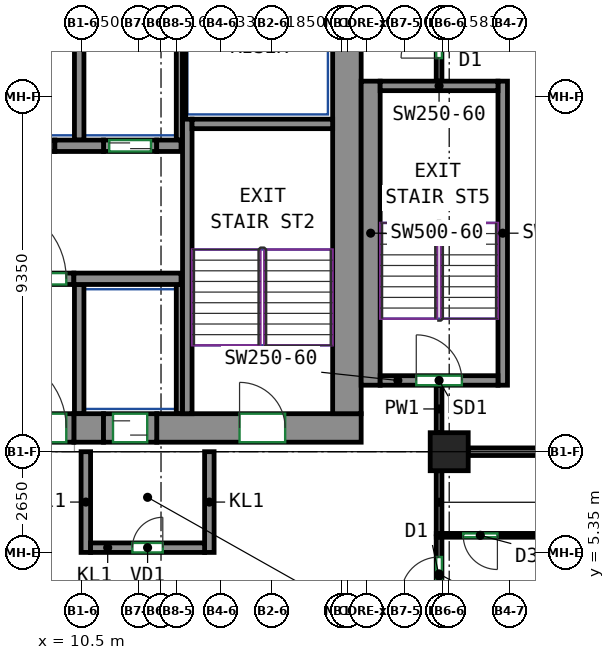
"""IFC4 building model, lengths in metres.
Left out: names, types, materials, properties, quantities, classifications, styles, units other than length and angle.
Written with IfcOpenShell. Run it as: python <this file> out.ifc"""

import sys

from ifc_helpers import new_model, si_unit, direction, frame, frame_2d, origin, origin_2d, place, context, subcontext, project, spatial, rectangle, extrude, source, transform, mapped, element, fill, save


model = new_model("IFC4")
c1 = context("Model", 3, precision=1e-05, world=origin(), true_north=direction((0.0, 1.0)))
c2 = subcontext(c1, "Body", "Model", "MODEL_VIEW")
j1 = project(units=[si_unit("LENGTHUNIT", "METRE"), si_unit("PLANEANGLEUNIT", "RADIAN")], contexts=[c1])
p1 = place(None, origin())
s1 = spatial("IfcSite", under=j1, at=p1, CompositionType="ELEMENT")
p2 = place(p1, origin())
s2 = spatial("IfcBuilding", under=s1, at=p2, CompositionType="ELEMENT")
p3 = place(p2, frame((0.0, 0.0, 206.7)))
s3 = spatial("IfcBuildingStorey", under=s2, at=p3, CompositionType="ELEMENT", Elevation=206.7)
m1 = source(origin(), c2, "Body", "SweptSolid", [
    extrude(rectangle(XDim=1.0, YDim=1.0, at=origin_2d()), origin(), (0.0, 0.0, 1.0), 3.12),
])
p4 = place(p3, frame((20.167, 8.0, 0.0), z_axis=(0.0, 0.0, 1.0), x_axis=(1.0, 0.0, 0.0)))
e1 = element("IfcColumn", 1, at=p4, inside=s3, PredefinedType="COLUMN", context=c2, shape_type="MappedRepresentation", body=[
    mapped(m1, transform((0.0, 0.0, 0.0))),
])
m2 = source(origin(), c2, "Body", "SweptSolid", [
    extrude(rectangle(XDim=0.78, YDim=0.75, at=frame_2d((0.39, 0.0))), origin(), (0.0, 0.0, 1.0), 3.12),
])
p5 = place(p3, frame((10.29, 8.625, 0.0), z_axis=(0.0, 0.0, 1.0), x_axis=(1.0, 0.0, 0.0)))
e2 = element("IfcWall", 2, at=p5, inside=s3, PredefinedType="SHEAR", context=c2, shape_type="MappedRepresentation", body=[
    mapped(m2, transform((0.0, 0.0, 0.0))),
])
m3 = source(origin(), c2, "Body", "SweptSolid", [
    extrude(rectangle(XDim=5.38, YDim=0.75, at=frame_2d((2.69, 0.0))), origin(), (0.0, 0.0, 1.0), 3.12),
])
p6 = place(p3, frame((12.47, 8.625, 0.0), z_axis=(0.0, 0.0, 1.0), x_axis=(1.0, 0.0, 0.0)))
e3 = element("IfcWall", 3, at=p6, inside=s3, PredefinedType="SHEAR", context=c2, shape_type="MappedRepresentation", body=[
    mapped(m3, transform((0.0, 0.0, 0.0))),
])
p7 = place(p6, frame((2.18, 0.0, 0.0)))
e4 = element("IfcOpeningElement", 4, at=p7, cuts=e3, PredefinedType="OPENING", context=c2, shape_type="SweptSolid", body=[
    extrude(rectangle(XDim=1.2, YDim=2.1, at=frame_2d((0.6, 1.05))), frame((0.0, 0.385, 0.0), z_axis=(0.0, -1.0, 0.0), x_axis=(1.0, 0.0, 0.0)), (0.0, 0.0, 1.0), 0.77),
])
m4 = source(origin(), c2, "Body", "SweptSolid", [
    extrude(rectangle(XDim=12.0, YDim=0.75, at=frame_2d((6.0, 0.0))), origin(), (0.0, 0.0, 1.0), 3.12),
])
p8 = place(p3, frame((17.475, 9.0, 0.0), z_axis=(0.0, 0.0, 1.0), x_axis=(0.0, 1.0, 0.0)))
e5 = element("IfcWall", 5, at=p8, inside=s3, PredefinedType="SHEAR", context=c2, shape_type="MappedRepresentation", body=[
    mapped(m4, transform((0.0, 0.0, 0.0))),
])
m5 = source(origin(), c2, "Body", "SweptSolid", [
    extrude(rectangle(XDim=7.75, YDim=0.25, at=frame_2d((3.875, 0.0))), origin(), (0.0, 0.0, 1.0), 3.12),
])
p9 = place(p3, frame((13.275, 9.0, 0.0), z_axis=(0.0, 0.0, 1.0), x_axis=(0.0, 1.0, 0.0)))
e6 = element("IfcWall", 6, at=p9, inside=s3, PredefinedType="SHEAR", context=c2, shape_type="MappedRepresentation", body=[
    mapped(m5, transform((0.0, 0.0, 0.0))),
])
m6 = source(origin(), c2, "Body", "SweptSolid", [
    extrude(rectangle(XDim=3.7, YDim=0.25, at=frame_2d((1.85, 0.0))), origin(), (0.0, 0.0, 1.0), 3.12),
])
p10 = place(p3, frame((13.4, 16.625, 0.0), z_axis=(0.0, 0.0, 1.0), x_axis=(1.0, 0.0, 0.0)))
e7 = element("IfcWall", 7, at=p10, inside=s3, PredefinedType="SHEAR", context=c2, shape_type="MappedRepresentation", body=[
    mapped(m6, transform((0.0, 0.0, 0.0))),
])
m7 = source(origin(), c2, "Body", "SweptSolid", [
    extrude(rectangle(XDim=8.0, YDim=0.5, at=frame_2d((4.0, 0.0))), origin(), (0.0, 0.0, 1.0), 3.12),
])
p11 = place(p3, frame((18.1, 9.75, 0.0), z_axis=(0.0, 0.0, 1.0), x_axis=(0.0, 1.0, 0.0)))
e8 = element("IfcWall", 8, at=p11, inside=s3, PredefinedType="SHEAR", context=c2, shape_type="MappedRepresentation", body=[
    mapped(m7, transform((0.0, 0.0, 0.0))),
])
m8 = source(origin(), c2, "Body", "SweptSolid", [
    extrude(rectangle(XDim=8.0, YDim=0.25, at=frame_2d((4.0, 0.0))), origin(), (0.0, 0.0, 1.0), 3.12),
])
p12 = place(p3, frame((21.575, 9.75, 0.0), z_axis=(0.0, 0.0, 1.0), x_axis=(0.0, 1.0, 0.0)))
e9 = element("IfcWall", 9, at=p12, inside=s3, PredefinedType="SHEAR", context=c2, shape_type="MappedRepresentation", body=[
    mapped(m8, transform((0.0, 0.0, 0.0))),
])
m9 = source(origin(), c2, "Body", "SweptSolid", [
    extrude(rectangle(XDim=3.1, YDim=0.25, at=frame_2d((1.55, 0.0))), origin(), (0.0, 0.0, 1.0), 3.12),
])
p13 = place(p3, frame((18.35, 9.875, 0.0), z_axis=(0.0, 0.0, 1.0), x_axis=(1.0, 0.0, 0.0)))
e10 = element("IfcWall", 10, at=p13, inside=s3, PredefinedType="SHEAR", context=c2, shape_type="MappedRepresentation", body=[
    mapped(m9, transform((0.0, 0.0, 0.0))),
])
p14 = place(p13, frame((0.95, 0.0, 0.0)))
e11 = element("IfcOpeningElement", 11, at=p14, cuts=e10, PredefinedType="OPENING", context=c2, shape_type="SweptSolid", body=[
    extrude(rectangle(XDim=1.2, YDim=2.1, at=frame_2d((0.6, 1.05))), frame((0.0, 0.135, 0.0), z_axis=(0.0, -1.0, 0.0), x_axis=(1.0, 0.0, 0.0)), (0.0, 0.0, 1.0), 0.27),
])
p15 = place(p3, frame((18.35, 17.625, 0.0), z_axis=(0.0, 0.0, 1.0), x_axis=(1.0, 0.0, 0.0)))
e12 = element("IfcWall", 12, at=p15, inside=s3, PredefinedType="SHEAR", context=c2, shape_type="MappedRepresentation", body=[
    mapped(m9, transform((0.0, 0.0, 0.0))),
])
m10 = source(origin(), c2, "Body", "SweptSolid", [
    extrude(rectangle(XDim=2.82, YDim=0.3, at=frame_2d((1.41, 0.0))), origin(), (0.0, 0.0, 1.0), 3.12),
])
p16 = place(p3, frame((10.29, 12.55, 0.0), z_axis=(0.0, 0.0, 1.0), x_axis=(1.0, 0.0, 0.0)))
e13 = element("IfcWall", 13, at=p16, inside=s3, PredefinedType="SHEAR", context=c2, shape_type="MappedRepresentation", body=[
    mapped(m10, transform((0.0, 0.0, 0.0))),
])
m11 = source(origin(), c2, "Body", "SweptSolid", [
    extrude(rectangle(XDim=1.28, YDim=0.3, at=frame_2d((0.64, 0.0))), origin(), (0.0, 0.0, 1.0), 3.12),
])
p17 = place(p3, frame((9.79, 16.05, 0.0), z_axis=(0.0, 0.0, 1.0), x_axis=(1.0, 0.0, 0.0)))
e14 = element("IfcWall", 14, at=p17, inside=s3, PredefinedType="SHEAR", context=c2, shape_type="MappedRepresentation", body=[
    mapped(m11, transform((0.0, 0.0, 0.0))),
])
m12 = source(origin(), c2, "Body", "SweptSolid", [
    extrude(rectangle(XDim=0.64, YDim=0.3, at=frame_2d((0.32, 0.0))), origin(), (0.0, 0.0, 1.0), 3.12),
])
p18 = place(p3, frame((12.47, 16.05, 0.0), z_axis=(0.0, 0.0, 1.0), x_axis=(1.0, 0.0, 0.0)))
e15 = element("IfcWall", 15, at=p18, inside=s3, PredefinedType="SHEAR", context=c2, shape_type="MappedRepresentation", body=[
    mapped(m12, transform((0.0, 0.0, 0.0))),
])
m13 = source(origin(), c2, "Body", "SweptSolid", [
    extrude(rectangle(XDim=1.4, YDim=0.3, at=frame_2d((0.7, 0.0))), origin(), (0.0, 0.0, 1.0), 3.12),
])
p19 = place(p3, frame((11.07, 16.05, 0.0), z_axis=(0.0, 0.0, 1.0), x_axis=(1.0, 0.0, 0.0)))
e16 = element("IfcWall", 16, at=p19, inside=s3, PredefinedType="PARTITIONING", context=c2, shape_type="MappedRepresentation", body=[
    mapped(m13, transform((0.0, 0.0, 0.0))),
])
p20 = place(p19, frame((0.15, 0.0, 0.0)))
e17 = element("IfcOpeningElement", 17, at=p20, cuts=e16, PredefinedType="OPENING", context=c2, shape_type="SweptSolid", body=[
    extrude(rectangle(XDim=1.1, YDim=2.1, at=frame_2d((0.55, 1.05))), frame((0.0, 0.16, 0.0), z_axis=(0.0, -1.0, 0.0), x_axis=(1.0, 0.0, 0.0)), (0.0, 0.0, 1.0), 0.32),
])
m14 = source(origin(), c2, "Body", "SweptSolid", [
    extrude(rectangle(XDim=2.4, YDim=0.3, at=frame_2d((1.2, 0.0))), origin(), (0.0, 0.0, 1.0), 3.12),
])
p21 = place(p3, frame((7.89, 12.55, 0.0), z_axis=(0.0, 0.0, 1.0), x_axis=(1.0, 0.0, 0.0)))
e18 = element("IfcWall", 18, at=p21, inside=s3, PredefinedType="PARTITIONING", context=c2, shape_type="MappedRepresentation", body=[
    mapped(m14, transform((0.0, 0.0, 0.0))),
])
p22 = place(p21, frame((0.2, 0.0, 0.0)))
e19 = element("IfcOpeningElement", 19, at=p22, cuts=e18, PredefinedType="OPENING", context=c2, shape_type="SweptSolid", body=[
    extrude(rectangle(XDim=2.0, YDim=2.1, at=frame_2d((1.0, 1.05))), frame((0.0, 0.16, 0.0), z_axis=(0.0, -1.0, 0.0), x_axis=(1.0, 0.0, 0.0)), (0.0, 0.0, 1.0), 0.32),
])
m15 = source(origin(), c2, "Body", "SweptSolid", [
    extrude(rectangle(XDim=1.4, YDim=0.3, at=frame_2d((0.7, 0.0))), origin(), (0.0, 0.0, 1.0), 3.12),
])
p23 = place(p3, frame((8.39, 16.05, 0.0), z_axis=(0.0, 0.0, 1.0), x_axis=(1.0, 0.0, 0.0)))
e20 = element("IfcWall", 20, at=p23, inside=s3, PredefinedType="PARTITIONING", context=c2, shape_type="MappedRepresentation", body=[
    mapped(m15, transform((0.0, 0.0, 0.0))),
])
m16 = source(origin(), c2, "Body", "SweptSolid", [
    extrude(rectangle(XDim=2.65, YDim=0.25, at=frame_2d((1.325, 0.0))), origin(), (0.0, 0.0, 1.0), 3.12),
])
for number, where, z_axis, x_axis in (
    (21, (10.605, 5.35, 0.0), (0.0, 0.0, 1.0), (0.0, 1.0, 0.0)),
    (22, (13.855, 5.35, 0.0), (0.0, 0.0, 1.0), (0.0, 1.0, 0.0)),
):
    element("IfcWall", number, at=place(p3, frame(where, z_axis=z_axis, x_axis=x_axis)), inside=s3, PredefinedType="PARTITIONING", context=c2, shape_type="MappedRepresentation", body=[
        mapped(m16, transform((0.0, 0.0, 0.0))),
    ])
m17 = source(origin(), c2, "Body", "SweptSolid", [
    extrude(rectangle(XDim=3.0, YDim=0.25, at=frame_2d((1.5, 0.0))), origin(), (0.0, 0.0, 1.0), 3.12),
])
p24 = place(p3, frame((10.73, 5.475, 0.0), z_axis=(0.0, 0.0, 1.0), x_axis=(1.0, 0.0, 0.0)))
e23 = element("IfcWall", 23, at=p24, inside=s3, PredefinedType="PARTITIONING", context=c2, shape_type="MappedRepresentation", body=[
    mapped(m17, transform((0.0, 0.0, 0.0))),
])
p25 = place(p24, frame((1.1, 0.0, 0.0)))
e24 = element("IfcOpeningElement", 24, at=p25, cuts=e23, PredefinedType="OPENING", context=c2, shape_type="SweptSolid", body=[
    extrude(rectangle(XDim=0.8, YDim=2.0, at=frame_2d((0.4, 1.0))), frame((0.0, 0.135, 0.0), z_axis=(0.0, -1.0, 0.0), x_axis=(1.0, 0.0, 0.0)), (0.0, 0.0, 1.0), 0.27),
])
m18 = source(origin(), c2, "Body", "SweptSolid", [
    extrude(rectangle(XDim=3.275, YDim=0.165, at=frame_2d((1.638, 0.0))), origin(), (0.0, 0.0, 1.0), 3.12),
])
p26 = place(p3, frame((13.067, 16.2, 0.0), z_axis=(0.0, 0.0, 1.0), x_axis=(0.0, 1.0, 0.0)))
e25 = element("IfcWall", 25, at=p26, inside=s3, PredefinedType="PARTITIONING", context=c2, shape_type="MappedRepresentation", body=[
    mapped(m18, transform((0.0, 0.0, 0.0))),
])
m19 = source(origin(), c2, "Body", "SweptSolid", [
    extrude(rectangle(XDim=3.275, YDim=0.25, at=frame_2d((1.638, 0.0))), origin(), (0.0, 0.0, 1.0), 3.12),
])
p27 = place(p3, frame((10.43, 16.2, 0.0), z_axis=(0.0, 0.0, 1.0), x_axis=(0.0, 1.0, 0.0)))
e26 = element("IfcWall", 26, at=p27, inside=s3, PredefinedType="PARTITIONING", context=c2, shape_type="MappedRepresentation", body=[
    mapped(m19, transform((0.0, 0.0, 0.0))),
])
m20 = source(origin(), c2, "Body", "SweptSolid", [
    extrude(rectangle(XDim=2.725, YDim=0.085, at=frame_2d((1.363, 0.0))), origin(), (0.0, 0.0, 1.0), 3.12),
])
p28 = place(p3, frame((13.192, 16.75, 0.0), z_axis=(0.0, 0.0, 1.0), x_axis=(0.0, 1.0, 0.0)))
e27 = element("IfcWall", 27, at=p28, inside=s3, PredefinedType="PARTITIONING", context=c2, shape_type="MappedRepresentation", body=[
    mapped(m20, transform((0.0, 0.0, 0.0))),
])
m21 = source(origin(), c2, "Body", "SweptSolid", [
    extrude(rectangle(XDim=3.4, YDim=0.25, at=frame_2d((1.7, 0.0))), origin(), (0.0, 0.0, 1.0), 3.12),
])
p29 = place(p3, frame((10.43, 9.0, 0.0), z_axis=(0.0, 0.0, 1.0), x_axis=(0.0, 1.0, 0.0)))
e28 = element("IfcWall", 28, at=p29, inside=s3, PredefinedType="PARTITIONING", context=c2, shape_type="MappedRepresentation", body=[
    mapped(m21, transform((0.0, 0.0, 0.0))),
])
m22 = source(origin(), c2, "Body", "SweptSolid", [
    extrude(rectangle(XDim=3.4, YDim=0.165, at=frame_2d((1.7, 0.0))), origin(), (0.0, 0.0, 1.0), 3.12),
])
p30 = place(p3, frame((13.067, 9.0, 0.0), z_axis=(0.0, 0.0, 1.0), x_axis=(0.0, 1.0, 0.0)))
e29 = element("IfcWall", 29, at=p30, inside=s3, PredefinedType="PARTITIONING", context=c2, shape_type="MappedRepresentation", body=[
    mapped(m22, transform((0.0, 0.0, 0.0))),
])
m23 = source(origin(), c2, "Body", "SweptSolid", [
    extrude(rectangle(XDim=2.4, YDim=0.75, at=frame_2d((1.2, 0.0))), origin(), (0.0, 0.0, 1.0), 2.7),
])
p31 = place(p3, frame((7.89, 8.625, 0.0), z_axis=(0.0, 0.0, 1.0), x_axis=(1.0, 0.0, 0.0)))
e30 = element("IfcWall", 30, at=p31, inside=s3, PredefinedType="PARTITIONING", context=c2, shape_type="MappedRepresentation", body=[
    mapped(m23, transform((0.0, 0.0, 0.0))),
])
p32 = place(p31, frame((0.2, 0.0, 0.0)))
e31 = element("IfcOpeningElement", 31, at=p32, cuts=e30, PredefinedType="OPENING", context=c2, shape_type="SweptSolid", body=[
    extrude(rectangle(XDim=2.0, YDim=2.1, at=frame_2d((1.0, 1.05))), frame((0.0, 0.385, 0.0), z_axis=(0.0, -1.0, 0.0), x_axis=(1.0, 0.0, 0.0)), (0.0, 0.0, 1.0), 0.77),
])
m24 = source(origin(), c2, "Body", "SweptSolid", [
    extrude(rectangle(XDim=1.4, YDim=0.75, at=frame_2d((0.7, 0.0))), origin(), (0.0, 0.0, 1.0), 2.7),
])
p33 = place(p3, frame((11.07, 8.625, 0.0), z_axis=(0.0, 0.0, 1.0), x_axis=(1.0, 0.0, 0.0)))
e32 = element("IfcWall", 32, at=p33, inside=s3, PredefinedType="PARTITIONING", context=c2, shape_type="MappedRepresentation", body=[
    mapped(m24, transform((0.0, 0.0, 0.0))),
])
p34 = place(p33, frame((0.25, 0.0, 0.0)))
e33 = element("IfcOpeningElement", 33, at=p34, cuts=e32, PredefinedType="OPENING", context=c2, shape_type="SweptSolid", body=[
    extrude(rectangle(XDim=0.9, YDim=2.1, at=frame_2d((0.45, 1.05))), frame((0.0, 0.385, 0.0), z_axis=(0.0, -1.0, 0.0), x_axis=(1.0, 0.0, 0.0)), (0.0, 0.0, 1.0), 0.77),
])
p35 = place(p3, frame((19.9, 3.809, 0.0), z_axis=(0.0, 0.0, 1.0), x_axis=(0.0, 1.0, 0.0)))
e34 = element("IfcWall", 34, at=p35, inside=s3, PredefinedType="PARTITIONING", context=c2, shape_type="SweptSolid", body=[
    extrude(rectangle(XDim=1.951, YDim=0.15, at=frame_2d((0.976, 0.0))), origin(), (0.0, 0.0, 1.0), 2.52),
])
p36 = place(p35, frame((0.42, 0.0, 0.0)))
e35 = element("IfcOpeningElement", 35, at=p36, cuts=e34, PredefinedType="OPENING", context=c2, shape_type="SweptSolid", body=[
    extrude(rectangle(XDim=1.0, YDim=2.1, at=frame_2d((0.5, 1.05))), frame((0.0, 0.085, 0.0), z_axis=(0.0, -1.0, 0.0), x_axis=(1.0, 0.0, 0.0)), (0.0, 0.0, 1.0), 0.17),
])
p37 = place(p3, frame((19.9, 5.84, 0.0), z_axis=(0.0, 0.0, 1.0), x_axis=(0.0, 1.0, 0.0)))
e36 = element("IfcWall", 36, at=p37, inside=s3, PredefinedType="PARTITIONING", context=c2, shape_type="SweptSolid", body=[
    extrude(rectangle(XDim=1.66, YDim=0.15, at=frame_2d((0.83, 0.0))), origin(), (0.0, 0.0, 1.0), 2.52),
])
p38 = place(p3, frame((19.9, 17.75, 0.0), z_axis=(0.0, 0.0, 1.0), x_axis=(0.0, 1.0, 0.0)))
e37 = element("IfcWall", 37, at=p38, inside=s3, PredefinedType="PARTITIONING", context=c2, shape_type="SweptSolid", body=[
    extrude(rectangle(XDim=2.01, YDim=0.15, at=frame_2d((1.005, 0.0))), origin(), (0.0, 0.0, 1.0), 3.12),
])
p39 = place(p38, frame((0.607, 0.0, 0.0)))
e38 = element("IfcOpeningElement", 38, at=p39, cuts=e37, PredefinedType="OPENING", context=c2, shape_type="SweptSolid", body=[
    extrude(rectangle(XDim=1.0, YDim=2.1, at=frame_2d((0.5, 1.05))), frame((0.0, 0.085, 0.0), z_axis=(0.0, -1.0, 0.0), x_axis=(1.0, 0.0, 0.0)), (0.0, 0.0, 1.0), 0.17),
])
p40 = place(p3, frame((19.9, 8.5, 0.0), z_axis=(0.0, 0.0, 1.0), x_axis=(0.0, 1.0, 0.0)))
e39 = element("IfcWall", 39, at=p40, inside=s3, PredefinedType="PARTITIONING", context=c2, shape_type="SweptSolid", body=[
    extrude(rectangle(XDim=1.25, YDim=0.15, at=frame_2d((0.625, 0.0))), origin(), (0.0, 0.0, 1.0), 3.12),
])
p41 = place(p3, frame((22.652, 5.8, 0.0), z_axis=(0.0, 0.0, 1.0), x_axis=(-1.0, 0.0, 0.0)))
e40 = element("IfcWall", 40, at=p41, inside=s3, PredefinedType="PARTITIONING", context=c2, shape_type="SweptSolid", body=[
    extrude(rectangle(XDim=2.825, YDim=0.1, at=frame_2d((1.413, 0.0))), origin(), (0.0, 0.0, 1.0), 3.12),
])
p42 = place(p41, frame((1.217, 0.0, 0.0)))
e41 = element("IfcOpeningElement", 41, at=p42, cuts=e40, PredefinedType="OPENING", context=c2, shape_type="SweptSolid", body=[
    extrude(rectangle(XDim=0.9, YDim=2.1, at=frame_2d((0.45, 1.05))), frame((0.0, 0.06, 0.0), z_axis=(0.0, -1.0, 0.0), x_axis=(1.0, 0.0, 0.0)), (0.0, 0.0, 1.0), 0.12),
])
p43 = place(p3, frame((20.667, 8.0, 0.0), z_axis=(0.0, 0.0, 1.0), x_axis=(1.0, 0.0, 0.0)))
e42 = element("IfcWall", 42, at=p43, inside=s3, PredefinedType="PARTITIONING", context=c2, shape_type="SweptSolid", body=[
    extrude(rectangle(XDim=9.758, YDim=0.2, at=frame_2d((4.879, 0.0))), origin(), (0.0, 0.0, 1.0), 2.52),
])
p44 = place(p22, origin())
e43 = element("IfcDoor", 43, at=p44, inside=s3, OperationType="DOUBLE_DOOR_SINGLE_SWING", PredefinedType="DOOR", context=c2, shape_type="SweptSolid", body=[
    extrude(rectangle(XDim=2.0, YDim=2.1, at=frame_2d((1.0, 1.05))), frame((0.0, 0.025, 0.0), z_axis=(0.0, -1.0, 0.0), x_axis=(1.0, 0.0, 0.0)), (0.0, 0.0, 1.0), 0.05),
])
fill(e19, e43)
p45 = place(p32, origin())
e44 = element("IfcDoor", 44, at=p45, inside=s3, OperationType="DOUBLE_DOOR_SINGLE_SWING", PredefinedType="DOOR", context=c2, shape_type="SweptSolid", body=[
    extrude(rectangle(XDim=2.0, YDim=2.1, at=frame_2d((1.0, 1.05))), frame((0.0, 0.28, 0.0), z_axis=(0.0, -1.0, 0.0), x_axis=(1.0, 0.0, 0.0)), (0.0, 0.0, 1.0), 0.05),
])
fill(e31, e44)
p46 = place(p25, origin())
e45 = element("IfcDoor", 45, at=p46, inside=s3, OperationType="SINGLE_SWING_RIGHT", PredefinedType="DOOR", context=c2, shape_type="SweptSolid", body=[
    extrude(rectangle(XDim=0.8, YDim=2.0, at=frame_2d((0.4, 1.0))), frame((0.0, 0.025, 0.0), z_axis=(0.0, -1.0, 0.0), x_axis=(1.0, 0.0, 0.0)), (0.0, 0.0, 1.0), 0.05),
])
fill(e24, e45)
p47 = place(p34, origin())
e46 = element("IfcDoor", 46, at=p47, inside=s3, OperationType="SLIDING_TO_LEFT", PredefinedType="DOOR", context=c2, shape_type="SweptSolid", body=[
    extrude(rectangle(XDim=0.9, YDim=2.1, at=frame_2d((0.45, 1.05))), frame((0.0, 0.28, 0.0), z_axis=(0.0, -1.0, 0.0), x_axis=(1.0, 0.0, 0.0)), (0.0, 0.0, 1.0), 0.05),
])
fill(e33, e46)
p48 = place(p20, origin())
e47 = element("IfcDoor", 47, at=p48, inside=s3, OperationType="DOUBLE_DOOR_SLIDING", PredefinedType="DOOR", context=c2, shape_type="SweptSolid", body=[
    extrude(rectangle(XDim=1.1, YDim=2.1, at=frame_2d((0.55, 1.05))), frame((0.0, 0.025, 0.0), z_axis=(0.0, -1.0, 0.0), x_axis=(1.0, 0.0, 0.0)), (0.0, 0.0, 1.0), 0.05),
])
fill(e17, e47)
p49 = place(p7, origin())
e48 = element("IfcDoor", 48, at=p49, inside=s3, OperationType="DOUBLE_DOOR_SINGLE_SWING", PredefinedType="DOOR", context=c2, shape_type="SweptSolid", body=[
    extrude(rectangle(XDim=1.2, YDim=2.1, at=frame_2d((0.6, 1.05))), frame((0.0, 0.28, 0.0), z_axis=(0.0, -1.0, 0.0), x_axis=(1.0, 0.0, 0.0)), (0.0, 0.0, 1.0), 0.05),
])
fill(e4, e48)
p50 = place(p14, origin())
e49 = element("IfcDoor", 49, at=p50, inside=s3, OperationType="DOUBLE_DOOR_SINGLE_SWING", PredefinedType="DOOR", context=c2, shape_type="SweptSolid", body=[
    extrude(rectangle(XDim=1.2, YDim=2.1, at=frame_2d((0.6, 1.05))), frame((0.0, 0.025, 0.0), z_axis=(0.0, -1.0, 0.0), x_axis=(1.0, 0.0, 0.0)), (0.0, 0.0, 1.0), 0.05),
])
fill(e11, e49)
p51 = place(p36, origin())
e50 = element("IfcDoor", 50, at=p51, inside=s3, OperationType="SINGLE_SWING_LEFT", PredefinedType="DOOR", context=c2, shape_type="SweptSolid", body=[
    extrude(rectangle(XDim=1.0, YDim=2.1, at=frame_2d((0.5, 1.05))), frame((0.0, 0.025, 0.0), z_axis=(0.0, -1.0, 0.0), x_axis=(1.0, 0.0, 0.0)), (0.0, 0.0, 1.0), 0.05),
])
fill(e35, e50)
p52 = place(p42, origin())
e51 = element("IfcDoor", 51, at=p52, inside=s3, OperationType="SINGLE_SWING_LEFT", PredefinedType="DOOR", context=c2, shape_type="SweptSolid", body=[
    extrude(rectangle(XDim=0.9, YDim=2.1, at=frame_2d((0.45, 1.05))), frame((0.0, 0.025, 0.0), z_axis=(0.0, -1.0, 0.0), x_axis=(1.0, 0.0, 0.0)), (0.0, 0.0, 1.0), 0.05),
])
fill(e41, e51)
p53 = place(p39, origin())
e52 = element("IfcDoor", 52, at=p53, inside=s3, OperationType="SINGLE_SWING_LEFT", PredefinedType="DOOR", context=c2, shape_type="SweptSolid", body=[
    extrude(rectangle(XDim=1.0, YDim=2.1, at=frame_2d((0.5, 1.05))), frame((0.0, 0.025, 0.0), z_axis=(0.0, -1.0, 0.0), x_axis=(1.0, 0.0, 0.0)), (0.0, 0.0, 1.0), 0.05),
])
fill(e38, e52)
save(model, sys.argv[1])
